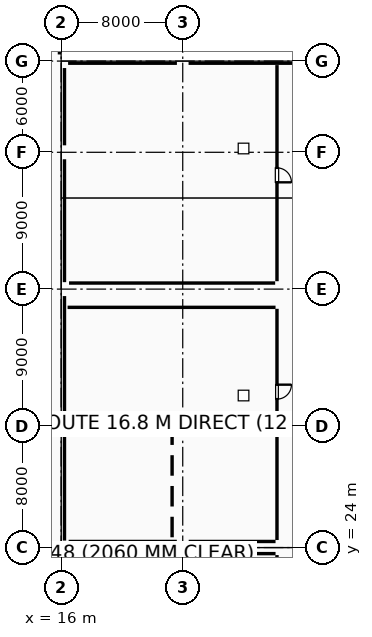
"""IFC4 building model, lengths in metres.
Left out: names, types, materials, properties, quantities, classifications, styles, units other than length and angle.
Written with IfcOpenShell. Run it as: python <this file> out.ifc"""

import sys

from ifc_helpers import new_model, si_unit, direction, frame, frame_2d, origin, origin_2d, place, context, subcontext, project, spatial, rectangle, extrude, element, fill, save


model = new_model("IFC4")
c1 = context("Model", 3, precision=1e-05, world=origin(), true_north=direction((0.0, 1.0)))
c2 = subcontext(c1, "Body", "Model", "MODEL_VIEW")
j1 = project(units=[si_unit("LENGTHUNIT", "METRE"), si_unit("PLANEANGLEUNIT", "RADIAN")], contexts=[c1])
p1 = place(None, origin())
s1 = spatial("IfcSite", under=j1, at=p1, CompositionType="ELEMENT")
p2 = place(p1, origin())
s2 = spatial("IfcBuilding", under=s1, at=p2, CompositionType="ELEMENT")
p3 = place(p2, frame((0.0, 0.0, 5.4)))
s3 = spatial("IfcBuildingStorey", under=s2, at=p3, CompositionType="ELEMENT", Elevation=5.4)
for number, where, z_axis, x_axis in (
    (1, (16.0, 24.0, 0.0), (0.0, 0.0, 1.0), (1.0, 0.0, 0.0)),
    (2, (16.0, 32.0, 0.0), (0.0, 0.0, 1.0), (1.0, 0.0, 0.0)),
    (3, (16.0, 41.0, 0.0), (0.0, 0.0, 1.0), (1.0, 0.0, 0.0)),
    (4, (16.0, 50.0, 0.0), (0.0, 0.0, 1.0), (1.0, 0.0, 0.0)),
    (5, (16.0, 56.0, 0.0), (0.0, 0.0, 1.0), (1.0, 0.0, 0.0)),
):
    element("IfcColumn", number, at=place(p3, frame(where, z_axis=z_axis, x_axis=x_axis)), inside=s3, PredefinedType="COLUMN", context=c2, shape_type="SweptSolid", body=[
        extrude(rectangle(XDim=0.9, YDim=0.9, at=origin_2d()), origin(), (0.0, 0.0, 1.0), 4.8),
    ])
for number, where, z_axis, x_axis in (
    (6, (24.0, 24.0, 0.0), (0.0, 0.0, 1.0), (1.0, 0.0, 0.0)),
    (7, (24.0, 50.0, 0.0), (0.0, 0.0, 1.0), (1.0, 0.0, 0.0)),
    (8, (24.0, 56.0, 0.0), (0.0, 0.0, 1.0), (1.0, 0.0, 0.0)),
):
    element("IfcColumn", number, at=place(p3, frame(where, z_axis=z_axis, x_axis=x_axis)), inside=s3, PredefinedType="COLUMN", context=c2, shape_type="SweptSolid", body=[
        extrude(rectangle(XDim=0.75, YDim=0.75, at=origin_2d()), origin(), (0.0, 0.0, 1.0), 4.8),
    ])
p4 = place(p3, frame((16.22, 21.204, 0.0), z_axis=(0.0, 0.0, 1.0), x_axis=(0.0, 1.0, 0.0)))
e9 = element("IfcWall", 9, at=p4, inside=s3, PredefinedType="STANDARD", context=c2, shape_type="SweptSolid", body=[
    extrude(rectangle(XDim=2.338, YDim=0.4, at=frame_2d((1.169, 0.0))), origin(), (0.0, 0.0, 1.0), 4.54),
])
p5 = place(p3, frame((16.22, 24.458, 0.0), z_axis=(0.0, 0.0, 1.0), x_axis=(0.0, 1.0, 0.0)))
e10 = element("IfcWall", 10, at=p5, inside=s3, PredefinedType="STANDARD", context=c2, shape_type="SweptSolid", body=[
    extrude(rectangle(XDim=7.084, YDim=0.4, at=frame_2d((3.542, 0.0))), origin(), (0.0, 0.0, 1.0), 3.975),
])
p6 = place(p5, frame((2.842, 0.0, 0.95)))
e11 = element("IfcOpeningElement", 11, at=p6, cuts=e10, PredefinedType="OPENING", context=c2, shape_type="SweptSolid", body=[
    extrude(rectangle(XDim=1.4, YDim=1.5, at=frame_2d((0.7, 0.75))), frame((0.0, 0.21, 0.0), z_axis=(0.0, -1.0, 0.0), x_axis=(1.0, 0.0, 0.0)), (0.0, 0.0, 1.0), 0.42),
])
p7 = place(p3, frame((16.22, 32.458, 0.0), z_axis=(0.0, 0.0, 1.0), x_axis=(0.0, 1.0, 0.0)))
e12 = element("IfcWall", 12, at=p7, inside=s3, PredefinedType="STANDARD", context=c2, shape_type="SweptSolid", body=[
    extrude(rectangle(XDim=8.084, YDim=0.4, at=frame_2d((4.042, 0.0))), origin(), (0.0, 0.0, 1.0), 4.025),
])
p8 = place(p7, frame((3.342, 0.0, 0.95)))
e13 = element("IfcOpeningElement", 13, at=p8, cuts=e12, PredefinedType="OPENING", context=c2, shape_type="SweptSolid", body=[
    extrude(rectangle(XDim=1.4, YDim=1.8, at=frame_2d((0.7, 0.9))), frame((0.0, 0.21, 0.0), z_axis=(0.0, -1.0, 0.0), x_axis=(1.0, 0.0, 0.0)), (0.0, 0.0, 1.0), 0.42),
])
p9 = place(p3, frame((16.22, 41.458, 0.0), z_axis=(0.0, 0.0, 1.0), x_axis=(0.0, 1.0, 0.0)))
e14 = element("IfcWall", 14, at=p9, inside=s3, PredefinedType="STANDARD", context=c2, shape_type="SweptSolid", body=[
    extrude(rectangle(XDim=8.084, YDim=0.4, at=frame_2d((4.042, 0.0))), origin(), (0.0, 0.0, 1.0), 4.075),
])
p10 = place(p9, frame((3.342, 0.0, 0.95)))
e15 = element("IfcOpeningElement", 15, at=p10, cuts=e14, PredefinedType="OPENING", context=c2, shape_type="SweptSolid", body=[
    extrude(rectangle(XDim=1.4, YDim=2.1, at=frame_2d((0.7, 1.05))), frame((0.0, 0.21, 0.0), z_axis=(0.0, -1.0, 0.0), x_axis=(1.0, 0.0, 0.0)), (0.0, 0.0, 1.0), 0.42),
])
p11 = place(p3, frame((16.22, 50.458, 0.0), z_axis=(0.0, 0.0, 1.0), x_axis=(0.0, 1.0, 0.0)))
e16 = element("IfcWall", 16, at=p11, inside=s3, PredefinedType="STANDARD", context=c2, shape_type="SweptSolid", body=[
    extrude(rectangle(XDim=5.084, YDim=0.4, at=frame_2d((2.542, 0.0))), origin(), (0.0, 0.0, 1.0), 4.125),
])
p12 = place(p11, frame((1.742, 0.0, 0.95)))
e17 = element("IfcOpeningElement", 17, at=p12, cuts=e16, PredefinedType="OPENING", context=c2, shape_type="SweptSolid", body=[
    extrude(rectangle(XDim=1.6, YDim=1.2, at=frame_2d((0.8, 0.6))), frame((0.0, 0.21, 0.0), z_axis=(0.0, -1.0, 0.0), x_axis=(1.0, 0.0, 0.0)), (0.0, 0.0, 1.0), 0.42),
])
p13 = place(p3, frame((16.458, 55.86, 0.0), z_axis=(0.0, 0.0, 1.0), x_axis=(1.0, 0.0, 0.0)))
e18 = element("IfcWall", 18, at=p13, inside=s3, PredefinedType="ELEMENTEDWALL", context=c2, shape_type="SweptSolid", body=[
    extrude(rectangle(XDim=7.159, YDim=0.24, at=frame_2d((3.58, 0.0))), origin(), (0.0, 0.0, 1.0), 4.075),
])
p14 = place(p13, frame((2.78, 0.0, 0.95)))
e19 = element("IfcOpeningElement", 19, at=p14, cuts=e18, PredefinedType="OPENING", context=c2, shape_type="SweptSolid", body=[
    extrude(rectangle(XDim=1.6, YDim=1.5, at=frame_2d((0.8, 0.75))), frame((0.0, 0.13, 0.0), z_axis=(0.0, -1.0, 0.0), x_axis=(1.0, 0.0, 0.0)), (0.0, 0.0, 1.0), 0.26),
])
p15 = place(p3, frame((24.383, 55.86, 0.0), z_axis=(0.0, 0.0, 1.0), x_axis=(1.0, 0.0, 0.0)))
e20 = element("IfcWall", 20, at=p15, inside=s3, PredefinedType="ELEMENTEDWALL", context=c2, shape_type="SweptSolid", body=[
    extrude(rectangle(XDim=7.234, YDim=0.24, at=frame_2d((3.617, 0.0))), origin(), (0.0, 0.0, 1.0), 3.525),
])
p16 = place(p15, frame((2.817, 0.0, 0.95)))
e21 = element("IfcOpeningElement", 21, at=p16, cuts=e20, PredefinedType="OPENING", context=c2, shape_type="SweptSolid", body=[
    extrude(rectangle(XDim=1.6, YDim=1.8, at=frame_2d((0.8, 0.9))), frame((0.0, 0.13, 0.0), z_axis=(0.0, -1.0, 0.0), x_axis=(1.0, 0.0, 0.0)), (0.0, 0.0, 1.0), 0.26),
])
p17 = place(p3, frame((15.89, 73.87, 0.0), z_axis=(0.0, 0.0, 1.0), x_axis=(0.0, -1.0, 0.0)))
e22 = element("IfcWall", 22, at=p17, inside=s3, PredefinedType="PARAPET", context=c2, shape_type="SweptSolid", body=[
    extrude(rectangle(XDim=17.434, YDim=0.18, at=frame_2d((8.717, 0.0))), origin(), (0.0, 0.0, 1.0), 1.15),
])
p18 = place(p3, frame((16.424, 39.8, 0.0), z_axis=(0.0, 0.0, 1.0), x_axis=(1.0, 0.0, 0.0)))
e23 = element("IfcWall", 23, at=p18, inside=s3, PredefinedType="PARTITIONING", context=c2, shape_type="SweptSolid", body=[
    extrude(rectangle(XDim=13.681, YDim=0.15, at=frame_2d((6.84, 0.0))), origin(), (0.0, 0.0, 1.0), 4.53),
])
p19 = place(p3, frame((30.2, 39.705, 0.0), z_axis=(0.0, 0.0, 1.0), x_axis=(0.0, -1.0, 0.0)))
e24 = element("IfcWall", 24, at=p19, inside=s3, PredefinedType="PARTITIONING", context=c2, shape_type="SweptSolid", body=[
    extrude(rectangle(XDim=15.21, YDim=0.15, at=frame_2d((7.605, 0.0))), origin(), (0.0, 0.0, 1.0), 4.53),
])
p20 = place(p19, frame((4.991, 0.0, 0.0)))
e25 = element("IfcOpeningElement", 25, at=p20, cuts=e24, PredefinedType="OPENING", context=c2, shape_type="SweptSolid", body=[
    extrude(rectangle(XDim=0.95, YDim=2.15, at=frame_2d((0.475, 1.075))), frame((0.0, 0.085, 0.0), z_axis=(0.0, -1.0, 0.0), x_axis=(1.0, 0.0, 0.0)), (0.0, 0.0, 1.0), 0.17),
])
p21 = place(p3, frame((30.105, 24.4, 0.0), z_axis=(0.0, 0.0, 1.0), x_axis=(-1.0, 0.0, 0.0)))
e26 = element("IfcWall", 26, at=p21, inside=s3, PredefinedType="PARTITIONING", context=c2, shape_type="SweptSolid", body=[
    extrude(rectangle(XDim=5.715, YDim=0.15, at=frame_2d((2.857, 0.0))), origin(), (0.0, 0.0, 1.0), 3.77),
])
p22 = place(p3, frame((23.61, 24.4, 0.0), z_axis=(0.0, 0.0, 1.0), x_axis=(-1.0, 0.0, 0.0)))
e27 = element("IfcWall", 27, at=p22, inside=s3, PredefinedType="PARTITIONING", context=c2, shape_type="SweptSolid", body=[
    extrude(rectangle(XDim=7.115, YDim=0.15, at=frame_2d((3.558, 0.0))), origin(), (0.0, 0.0, 1.0), 3.67),
])
p23 = place(p3, frame((30.2, 55.736, 0.0), z_axis=(0.0, 0.0, 1.0), x_axis=(0.0, -1.0, 0.0)))
e28 = element("IfcWall", 28, at=p23, inside=s3, PredefinedType="PARTITIONING", context=c2, shape_type="SweptSolid", body=[
    extrude(rectangle(XDim=14.216, YDim=0.2, at=frame_2d((7.108, 0.0))), origin(), (0.0, 0.0, 1.0), 4.53),
])
p24 = place(p23, frame((6.761, 0.0, 0.0)))
e29 = element("IfcOpeningElement", 29, at=p24, cuts=e28, PredefinedType="OPENING", context=c2, shape_type="SweptSolid", body=[
    extrude(rectangle(XDim=0.95, YDim=2.15, at=frame_2d((0.475, 1.075))), frame((0.0, 0.11, 0.0), z_axis=(0.0, -1.0, 0.0), x_axis=(1.0, 0.0, 0.0)), (0.0, 0.0, 1.0), 0.22),
])
p25 = place(p3, frame((30.08, 41.4, 0.0), z_axis=(0.0, 0.0, 1.0), x_axis=(-1.0, 0.0, 0.0)))
e30 = element("IfcWall", 30, at=p25, inside=s3, PredefinedType="PARTITIONING", context=c2, shape_type="SweptSolid", body=[
    extrude(rectangle(XDim=13.56, YDim=0.2, at=frame_2d((6.78, 0.0))), origin(), (0.0, 0.0, 1.0), 4.53),
])
p26 = place(p3, frame((30.2, 23.505, 0.0), z_axis=(0.0, 0.0, 1.0), x_axis=(0.0, -1.0, 0.0)))
e31 = element("IfcWall", 31, at=p26, inside=s3, PredefinedType="PARTITIONING", context=c2, shape_type="SweptSolid", body=[
    extrude(rectangle(XDim=15.241, YDim=0.15, at=frame_2d((7.621, 0.0))), origin(), (0.0, 0.0, 1.0), 4.53),
])
p27 = place(p26, frame((12.006, 0.0, 0.0)))
e32 = element("IfcOpeningElement", 32, at=p27, cuts=e31, PredefinedType="OPENING", context=c2, shape_type="SweptSolid", body=[
    extrude(rectangle(XDim=1.05, YDim=2.15, at=frame_2d((0.525, 1.075))), frame((0.0, 0.085, 0.0), z_axis=(0.0, -1.0, 0.0), x_axis=(1.0, 0.0, 0.0)), (0.0, 0.0, 1.0), 0.17),
])
p28 = place(p3, frame((16.495, 23.6, 0.0), z_axis=(0.0, 0.0, 1.0), x_axis=(1.0, 0.0, 0.0)))
e33 = element("IfcWall", 33, at=p28, inside=s3, PredefinedType="PARTITIONING", context=c2, shape_type="SweptSolid", body=[
    extrude(rectangle(XDim=7.115, YDim=0.15, at=frame_2d((3.558, 0.0))), origin(), (0.0, 0.0, 1.0), 3.67),
])
p29 = place(p3, frame((24.39, 23.6, 0.0), z_axis=(0.0, 0.0, 1.0), x_axis=(1.0, 0.0, 0.0)))
e34 = element("IfcWall", 34, at=p29, inside=s3, PredefinedType="PARTITIONING", context=c2, shape_type="SweptSolid", body=[
    extrude(rectangle(XDim=5.715, YDim=0.15, at=frame_2d((2.857, 0.0))), origin(), (0.0, 0.0, 1.0), 3.77),
])
p30 = place(p6, origin())
e35 = element("IfcWindow", 35, at=p30, inside=s3, PartitioningType="SINGLE_PANEL", PredefinedType="WINDOW", context=c2, shape_type="SweptSolid", body=[
    extrude(rectangle(XDim=1.4, YDim=1.5, at=frame_2d((0.7, 0.75))), frame((0.0, 0.03, 0.0), z_axis=(0.0, -1.0, 0.0), x_axis=(1.0, 0.0, 0.0)), (0.0, 0.0, 1.0), 0.06),
])
fill(e11, e35)
p31 = place(p8, origin())
e36 = element("IfcWindow", 36, at=p31, inside=s3, PartitioningType="SINGLE_PANEL", PredefinedType="WINDOW", context=c2, shape_type="SweptSolid", body=[
    extrude(rectangle(XDim=1.4, YDim=1.8, at=frame_2d((0.7, 0.9))), frame((0.0, 0.03, 0.0), z_axis=(0.0, -1.0, 0.0), x_axis=(1.0, 0.0, 0.0)), (0.0, 0.0, 1.0), 0.06),
])
fill(e13, e36)
p32 = place(p10, origin())
e37 = element("IfcWindow", 37, at=p32, inside=s3, PartitioningType="SINGLE_PANEL", PredefinedType="WINDOW", context=c2, shape_type="SweptSolid", body=[
    extrude(rectangle(XDim=1.4, YDim=2.1, at=frame_2d((0.7, 1.05))), frame((0.0, 0.03, 0.0), z_axis=(0.0, -1.0, 0.0), x_axis=(1.0, 0.0, 0.0)), (0.0, 0.0, 1.0), 0.06),
])
fill(e15, e37)
p33 = place(p12, origin())
e38 = element("IfcWindow", 38, at=p33, inside=s3, PartitioningType="SINGLE_PANEL", PredefinedType="WINDOW", context=c2, shape_type="SweptSolid", body=[
    extrude(rectangle(XDim=1.6, YDim=1.2, at=frame_2d((0.8, 0.6))), frame((0.0, 0.03, 0.0), z_axis=(0.0, -1.0, 0.0), x_axis=(1.0, 0.0, 0.0)), (0.0, 0.0, 1.0), 0.06),
])
fill(e17, e38)
p34 = place(p14, origin())
e39 = element("IfcWindow", 39, at=p34, inside=s3, PartitioningType="SINGLE_PANEL", PredefinedType="WINDOW", context=c2, shape_type="SweptSolid", body=[
    extrude(rectangle(XDim=1.6, YDim=1.5, at=frame_2d((0.8, 0.75))), frame((0.0, 0.03, 0.0), z_axis=(0.0, -1.0, 0.0), x_axis=(1.0, 0.0, 0.0)), (0.0, 0.0, 1.0), 0.06),
])
fill(e19, e39)
p35 = place(p16, origin())
e40 = element("IfcWindow", 40, at=p35, inside=s3, PartitioningType="SINGLE_PANEL", PredefinedType="WINDOW", context=c2, shape_type="SweptSolid", body=[
    extrude(rectangle(XDim=1.6, YDim=1.8, at=frame_2d((0.8, 0.9))), frame((0.0, 0.03, 0.0), z_axis=(0.0, -1.0, 0.0), x_axis=(1.0, 0.0, 0.0)), (0.0, 0.0, 1.0), 0.06),
])
fill(e21, e40)
p36 = place(p20, origin())
e41 = element("IfcDoor", 41, at=p36, inside=s3, OperationType="SINGLE_SWING_LEFT", PredefinedType="DOOR", context=c2, shape_type="SweptSolid", body=[
    extrude(rectangle(XDim=0.95, YDim=2.15, at=frame_2d((0.475, 1.075))), frame((0.0, 0.025, 0.0), z_axis=(0.0, -1.0, 0.0), x_axis=(1.0, 0.0, 0.0)), (0.0, 0.0, 1.0), 0.05),
])
fill(e25, e41)
p37 = place(p24, origin())
e42 = element("IfcDoor", 42, at=p37, inside=s3, OperationType="SINGLE_SWING_RIGHT", PredefinedType="DOOR", context=c2, shape_type="SweptSolid", body=[
    extrude(rectangle(XDim=0.95, YDim=2.15, at=frame_2d((0.475, 1.075))), frame((0.0, 0.025, 0.0), z_axis=(0.0, -1.0, 0.0), x_axis=(1.0, 0.0, 0.0)), (0.0, 0.0, 1.0), 0.05),
])
fill(e29, e42)
save(model, sys.argv[1])
